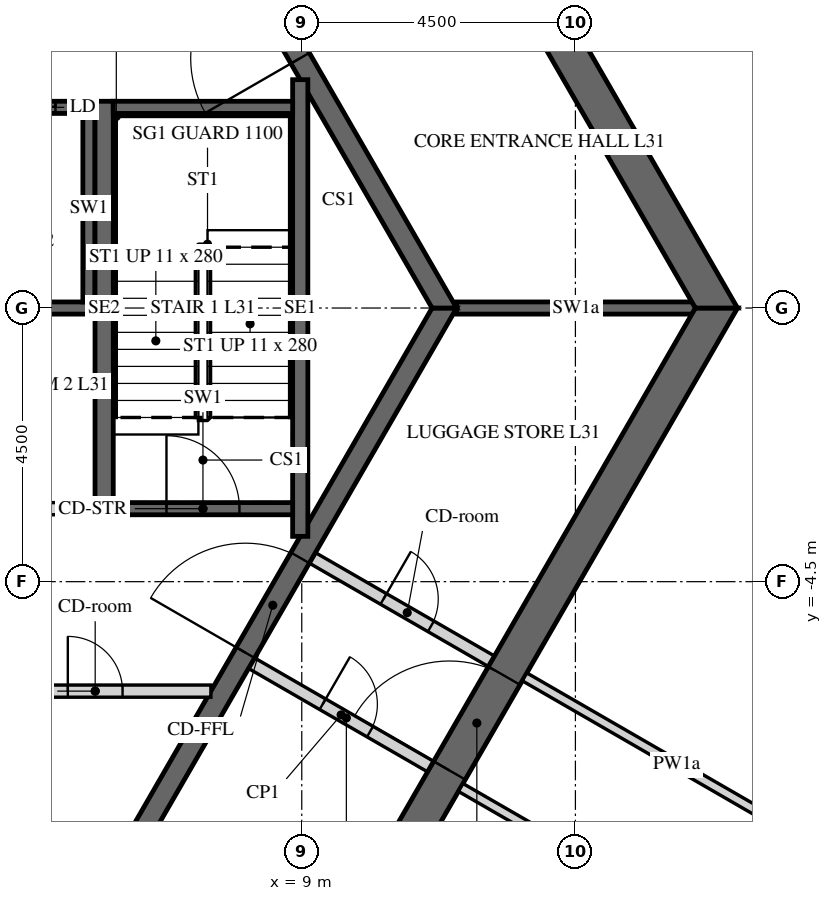
"""IFC4 building model, lengths in metres.
Left out: names, types, materials, properties, quantities, classifications, styles, units other than length and angle.
Written with IfcOpenShell. Run it as: python <this file> out.ifc"""

import sys

from ifc_helpers import new_model, si_unit, direction, frame, frame_2d, origin, place, context, subcontext, project, spatial, polyline, rectangle, outline, extrude, element, fill, save


model = new_model("IFC4")
c1 = context("Model", 3, precision=1e-05, world=origin(), true_north=direction((0.0, 1.0)))
c2 = subcontext(c1, "Body", "Model", "MODEL_VIEW")
j1 = project(units=[si_unit("LENGTHUNIT", "METRE"), si_unit("PLANEANGLEUNIT", "RADIAN")], contexts=[c1])
p1 = place(None, origin())
s1 = spatial("IfcSite", under=j1, at=p1, CompositionType="ELEMENT")
p2 = place(p1, origin())
s2 = spatial("IfcBuilding", under=s1, at=p2, CompositionType="ELEMENT")
p3 = place(p2, frame((0.0, 0.0, 135.0)))
s3 = spatial("IfcBuildingStorey", under=s2, at=p3, CompositionType="ELEMENT", Elevation=135.0)
p4 = place(p3, frame((7.91, -13.7, -0.15), z_axis=(0.0, 0.0, 1.0), x_axis=(0.499999880136, 0.866025472988, 0.0)))
e1 = element("IfcWall", 1, at=p4, inside=s3, PredefinedType="SHEAR", context=c2, shape_type="SweptSolid", body=[
    extrude(outline(polyline([(-0.173, -0.3), (15.993, -0.3), (15.646, 0.3), (0.173, 0.3), (-0.173, -0.3)])), origin(), (0.0, 0.0, 1.0), 3.9),
])
p5 = place(p4, frame((7.039, 0.0, 0.15)))
e2 = element("IfcOpeningElement", 2, at=p5, cuts=e1, PredefinedType="OPENING", context=c2, shape_type="SweptSolid", body=[
    extrude(rectangle(XDim=1.8, YDim=2.4, at=frame_2d((0.9, 1.2))), frame((0.0, 0.31, 0.0), z_axis=(0.0, -1.0, 0.0), x_axis=(1.0, 0.0, 0.0)), (0.0, 0.0, 1.0), 0.62),
])
p6 = place(p3, frame((15.819, 0.0, -0.15), z_axis=(0.0, 0.0, 1.0), x_axis=(-0.499999880136, 0.866025472988, 0.0)))
e3 = element("IfcWall", 3, at=p6, inside=s3, PredefinedType="SHEAR", context=c2, shape_type="SweptSolid", body=[
    extrude(outline(polyline([(-0.173, -0.3), (15.993, -0.3), (15.646, 0.3), (0.173, 0.3), (-0.173, -0.3)])), origin(), (0.0, 0.0, 1.0), 3.9),
])
p7 = place(p6, frame((6.981, 0.0, 0.15)))
e4 = element("IfcOpeningElement", 4, at=p7, cuts=e3, PredefinedType="OPENING", context=c2, shape_type="SweptSolid", body=[
    extrude(rectangle(XDim=1.8, YDim=2.4, at=frame_2d((0.9, 1.2))), frame((0.0, 0.31, 0.0), z_axis=(0.0, -1.0, 0.0), x_axis=(1.0, 0.0, 0.0)), (0.0, 0.0, 1.0), 0.62),
])
p8 = place(p3, frame((5.673, -9.825, -0.15), z_axis=(0.0, 0.0, 1.0), x_axis=(0.499995046907, 0.866028263435, 0.0)))
e5 = element("IfcWall", 5, at=p8, inside=s3, PredefinedType="SHEAR", context=c2, shape_type="SweptSolid", body=[
    extrude(outline(polyline([(-0.101, -0.175), (11.446, -0.175), (11.244, 0.175), (0.101, 0.175), (-0.101, -0.175)])), origin(), (0.0, 0.0, 1.0), 3.9),
])
p9 = place(p8, frame((4.801, 0.0, 0.15)))
e6 = element("IfcOpeningElement", 6, at=p9, cuts=e5, PredefinedType="OPENING", context=c2, shape_type="SweptSolid", body=[
    extrude(rectangle(XDim=1.8, YDim=2.4, at=frame_2d((0.9, 1.2))), frame((0.0, 0.185, 0.0), z_axis=(0.0, -1.0, 0.0), x_axis=(1.0, 0.0, 0.0)), (0.0, 0.0, 1.0), 0.37),
])
p10 = place(p3, frame((11.345, 0.0, -0.15), z_axis=(0.0, 0.0, 1.0), x_axis=(-0.499995046907, 0.866028263435, 0.0)))
e7 = element("IfcWall", 7, at=p10, inside=s3, PredefinedType="SHEAR", context=c2, shape_type="SweptSolid", body=[
    extrude(outline(polyline([(-0.101, -0.175), (11.446, -0.175), (11.244, 0.175), (0.101, 0.175), (-0.101, -0.175)])), origin(), (0.0, 0.0, 1.0), 3.9),
])
p11 = place(p10, frame((4.744, 0.0, 0.15)))
e8 = element("IfcOpeningElement", 8, at=p11, cuts=e7, PredefinedType="OPENING", context=c2, shape_type="SweptSolid", body=[
    extrude(rectangle(XDim=1.8, YDim=2.4, at=frame_2d((0.9, 1.2))), frame((0.0, 0.185, 0.0), z_axis=(0.0, -1.0, 0.0), x_axis=(1.0, 0.0, 0.0)), (0.0, 0.0, 1.0), 0.37),
])
p12 = place(p3, frame((-5.6, 3.3, -0.25), z_axis=(0.0, 0.0, 1.0), x_axis=(1.0, 0.0, 0.0)))
e9 = element("IfcWall", 9, at=p12, inside=s3, PredefinedType="SHEAR", context=c2, shape_type="SweptSolid", body=[
    extrude(rectangle(XDim=11.2, YDim=0.2, at=frame_2d((5.6, 0.0))), origin(), (0.0, 0.0, 1.0), 3.9),
])
p13 = place(p12, frame((0.65, 0.0, 0.25)))
e10 = element("IfcOpeningElement", 10, at=p13, cuts=e9, PredefinedType="OPENING", context=c2, shape_type="SweptSolid", body=[
    extrude(rectangle(XDim=1.1, YDim=2.1, at=frame_2d((0.55, 1.05))), frame((0.0, 0.11, 0.0), z_axis=(0.0, -1.0, 0.0), x_axis=(1.0, 0.0, 0.0)), (0.0, 0.0, 1.0), 0.22),
])
p14 = place(p12, frame((2.85, 0.0, 0.25)))
e11 = element("IfcOpeningElement", 11, at=p14, cuts=e9, PredefinedType="OPENING", context=c2, shape_type="SweptSolid", body=[
    extrude(rectangle(XDim=1.1, YDim=2.1, at=frame_2d((0.55, 1.05))), frame((0.0, 0.11, 0.0), z_axis=(0.0, -1.0, 0.0), x_axis=(1.0, 0.0, 0.0)), (0.0, 0.0, 1.0), 0.22),
])
p15 = place(p12, frame((5.05, 0.0, 0.25)))
e12 = element("IfcOpeningElement", 12, at=p15, cuts=e9, PredefinedType="OPENING", context=c2, shape_type="SweptSolid", body=[
    extrude(rectangle(XDim=1.1, YDim=2.1, at=frame_2d((0.55, 1.05))), frame((0.0, 0.11, 0.0), z_axis=(0.0, -1.0, 0.0), x_axis=(1.0, 0.0, 0.0)), (0.0, 0.0, 1.0), 0.22),
])
p16 = place(p12, frame((7.25, 0.0, 0.25)))
e13 = element("IfcOpeningElement", 13, at=p16, cuts=e9, PredefinedType="OPENING", context=c2, shape_type="SweptSolid", body=[
    extrude(rectangle(XDim=1.1, YDim=2.1, at=frame_2d((0.55, 1.05))), frame((0.0, 0.11, 0.0), z_axis=(0.0, -1.0, 0.0), x_axis=(1.0, 0.0, 0.0)), (0.0, 0.0, 1.0), 0.22),
])
p17 = place(p12, frame((9.45, 0.0, 0.25)))
e14 = element("IfcOpeningElement", 14, at=p17, cuts=e9, PredefinedType="OPENING", context=c2, shape_type="SweptSolid", body=[
    extrude(rectangle(XDim=1.1, YDim=2.1, at=frame_2d((0.55, 1.05))), frame((0.0, 0.11, 0.0), z_axis=(0.0, -1.0, 0.0), x_axis=(1.0, 0.0, 0.0)), (0.0, 0.0, 1.0), 0.22),
])
p18 = place(p3, frame((-5.6, 0.0, -0.25), z_axis=(0.0, 0.0, 1.0), x_axis=(1.0, 0.0, 0.0)))
e15 = element("IfcWall", 15, at=p18, inside=s3, PredefinedType="SHEAR", context=c2, shape_type="SweptSolid", body=[
    extrude(rectangle(XDim=11.2, YDim=0.2, at=frame_2d((5.6, 0.0))), origin(), (0.0, 0.0, 1.0), 3.9),
])
p19 = place(p3, frame((5.5, 0.1, -0.25), z_axis=(0.0, 0.0, 1.0), x_axis=(0.0, 1.0, 0.0)))
e16 = element("IfcWall", 16, at=p19, inside=s3, PredefinedType="SHEAR", context=c2, shape_type="SweptSolid", body=[
    extrude(rectangle(XDim=3.1, YDim=0.2, at=frame_2d((1.55, 0.0))), origin(), (0.0, 0.0, 1.0), 3.9),
])
p20 = place(p3, frame((0.1, -3.3, 0.0), z_axis=(0.0, 0.0, 1.0), x_axis=(1.0, 0.0, 0.0)))
e17 = element("IfcWall", 17, at=p20, inside=s3, PredefinedType="PARTITIONING", context=c2, shape_type="SweptSolid", body=[
    extrude(rectangle(XDim=5.5, YDim=0.2, at=frame_2d((2.75, 0.0))), origin(), (0.0, 0.0, 1.0), 3.65),
])
p21 = place(p20, frame((2.3, 0.0, 0.0)))
e18 = element("IfcOpeningElement", 18, at=p21, cuts=e17, PredefinedType="OPENING", context=c2, shape_type="SweptSolid", body=[
    extrude(rectangle(XDim=0.9, YDim=2.1, at=frame_2d((0.45, 1.05))), frame((0.0, 0.11, 0.0), z_axis=(0.0, -1.0, 0.0), x_axis=(1.0, 0.0, 0.0)), (0.0, 0.0, 1.0), 0.22),
])
p22 = place(p3, frame((3.7, -6.3, 0.0), z_axis=(0.0, 0.0, 1.0), x_axis=(1.0, 0.0, 0.0)))
e19 = element("IfcWall", 19, at=p22, inside=s3, PredefinedType="PARTITIONING", context=c2, shape_type="SweptSolid", body=[
    extrude(rectangle(XDim=3.806, YDim=0.2, at=frame_2d((1.903, 0.0))), origin(), (0.0, 0.0, 1.0), 3.65),
])
p23 = place(p22, frame((1.453, 0.0, 0.0)))
e20 = element("IfcOpeningElement", 20, at=p23, cuts=e19, PredefinedType="OPENING", context=c2, shape_type="SweptSolid", body=[
    extrude(rectangle(XDim=0.9, YDim=2.1, at=frame_2d((0.45, 1.05))), frame((0.0, 0.11, 0.0), z_axis=(0.0, -1.0, 0.0), x_axis=(1.0, 0.0, 0.0)), (0.0, 0.0, 1.0), 0.22),
])
p24 = place(p3, frame((11.547, 0.0, -0.15), z_axis=(0.0, 0.0, 1.0), x_axis=(1.0, 0.0, 0.0)))
e21 = element("IfcWall", 21, at=p24, inside=s3, PredefinedType="SHEAR", context=c2, shape_type="SweptSolid", body=[
    extrude(rectangle(XDim=3.926, YDim=0.2, at=frame_2d((1.963, 0.0))), origin(), (0.0, 0.0, 1.0), 3.9),
])
p25 = place(p3, frame((9.175, -4.109, 0.0), z_axis=(0.0, 0.0, 1.0), x_axis=(0.865989465428, -0.500062241894, 0.0)))
e22 = element("IfcWall", 22, at=p25, inside=s3, PredefinedType="PARTITIONING", context=c2, shape_type="SweptSolid", body=[
    extrude(rectangle(XDim=3.4, YDim=0.2, at=frame_2d((1.7, 0.0))), origin(), (0.0, 0.0, 1.0), 3.65),
])
p26 = place(p25, frame((1.351, 0.0, 0.0)))
e23 = element("IfcOpeningElement", 23, at=p26, cuts=e22, PredefinedType="OPENING", context=c2, shape_type="SweptSolid", body=[
    extrude(rectangle(XDim=0.9, YDim=2.1, at=frame_2d((0.45, 1.05))), frame((0.0, 0.11, 0.0), z_axis=(0.0, -1.0, 0.0), x_axis=(1.0, 0.0, 0.0)), (0.0, 0.0, 1.0), 0.22),
])
p27 = place(p3, frame((8.175, -5.841, 0.0), z_axis=(0.0, 0.0, 1.0), x_axis=(0.866020560687, -0.500008388397, 0.0)))
e24 = element("IfcWall", 24, at=p27, inside=s3, PredefinedType="PARTITIONING", context=c2, shape_type="SweptSolid", body=[
    extrude(rectangle(XDim=3.4, YDim=0.2, at=frame_2d((1.7, 0.0))), origin(), (0.0, 0.0, 1.0), 3.65),
])
p28 = place(p27, frame((1.35, 0.0, 0.0)))
e25 = element("IfcOpeningElement", 25, at=p28, cuts=e24, PredefinedType="OPENING", context=c2, shape_type="SweptSolid", body=[
    extrude(rectangle(XDim=0.9, YDim=2.1, at=frame_2d((0.45, 1.05))), frame((0.0, 0.11, 0.0), z_axis=(0.0, -1.0, 0.0), x_axis=(1.0, 0.0, 0.0)), (0.0, 0.0, 1.0), 0.22),
])
p29 = place(p3, frame((5.75, -3.4, -0.25), z_axis=(0.0, 0.0, 1.0), x_axis=(0.0, 1.0, 0.0)))
e26 = element("IfcWall", 26, at=p29, inside=s3, PredefinedType="SHEAR", context=c2, shape_type="SweptSolid", body=[
    extrude(rectangle(XDim=6.8, YDim=0.3, at=frame_2d((3.4, 0.0))), origin(), (0.0, 0.0, 1.0), 3.9),
])
p30 = place(p3, frame((8.975, -3.755, -0.25), z_axis=(0.0, 0.0, 1.0), x_axis=(0.0, 1.0, 0.0)))
e27 = element("IfcWall", 27, at=p30, inside=s3, PredefinedType="SHEAR", context=c2, shape_type="SweptSolid", body=[
    extrude(rectangle(XDim=7.51, YDim=0.25, at=frame_2d((3.755, 0.0))), origin(), (0.0, 0.0, 1.0), 3.9),
])
p31 = place(p3, frame((5.9, 3.3, -0.25), z_axis=(0.0, 0.0, 1.0), x_axis=(1.0, 0.0, 0.0)))
e28 = element("IfcWall", 28, at=p31, inside=s3, PredefinedType="SHEAR", context=c2, shape_type="SweptSolid", body=[
    extrude(rectangle(XDim=2.95, YDim=0.2, at=frame_2d((1.475, 0.0))), origin(), (0.0, 0.0, 1.0), 3.9),
])
p32 = place(p3, frame((5.9, -3.3, -0.25), z_axis=(0.0, 0.0, 1.0), x_axis=(1.0, 0.0, 0.0)))
e29 = element("IfcWall", 29, at=p32, inside=s3, PredefinedType="SHEAR", context=c2, shape_type="SweptSolid", body=[
    extrude(rectangle(XDim=2.95, YDim=0.2, at=frame_2d((1.475, 0.0))), origin(), (0.0, 0.0, 1.0), 3.9),
])
p33 = place(p32, frame((0.875, 0.0, 0.25)))
e30 = element("IfcOpeningElement", 30, at=p33, cuts=e29, PredefinedType="OPENING", context=c2, shape_type="SweptSolid", body=[
    extrude(rectangle(XDim=1.2, YDim=2.4, at=frame_2d((0.6, 1.2))), frame((0.0, 0.11, 0.0), z_axis=(0.0, -1.0, 0.0), x_axis=(1.0, 0.0, 0.0)), (0.0, 0.0, 1.0), 0.22),
])
p34 = place(p3, frame((13.755, -19.475, 0.0), z_axis=(0.0, 0.0, 1.0), x_axis=(0.50000013933, 0.866025323342, 0.0)))
e31 = element("IfcWall", 31, at=p34, inside=s3, PredefinedType="PARTITIONING", context=c2, shape_type="SweptSolid", body=[
    extrude(rectangle(XDim=23.517, YDim=0.15, at=frame_2d((11.758, 0.0))), origin(), (0.0, 0.0, 1.0), 2.838),
])
p35 = place(p34, frame((4.456, 0.0, 0.0)))
e32 = element("IfcOpeningElement", 32, at=p35, cuts=e31, PredefinedType="OPENING", context=c2, shape_type="SweptSolid", body=[
    extrude(rectangle(XDim=1.0, YDim=2.1, at=frame_2d((0.5, 1.05))), frame((0.0, 0.085, 0.0), z_axis=(0.0, -1.0, 0.0), x_axis=(1.0, 0.0, 0.0)), (0.0, 0.0, 1.0), 0.17),
])
p36 = place(p34, frame((13.699, 0.0, 0.0)))
e33 = element("IfcOpeningElement", 33, at=p36, cuts=e31, PredefinedType="OPENING", context=c2, shape_type="SweptSolid", body=[
    extrude(rectangle(XDim=1.0, YDim=2.1, at=frame_2d((0.5, 1.05))), frame((0.0, 0.085, 0.0), z_axis=(0.0, -1.0, 0.0), x_axis=(1.0, 0.0, 0.0)), (0.0, 0.0, 1.0), 0.17),
])
p37 = place(p34, frame((21.658, 0.0, 0.0)))
e34 = element("IfcOpeningElement", 34, at=p37, cuts=e31, PredefinedType="OPENING", context=c2, shape_type="SweptSolid", body=[
    extrude(rectangle(XDim=1.0, YDim=2.1, at=frame_2d((0.5, 1.05))), frame((0.0, 0.085, 0.0), z_axis=(0.0, -1.0, 0.0), x_axis=(1.0, 0.0, 0.0)), (0.0, 0.0, 1.0), 0.17),
])
p38 = place(p3, frame((25.467, 0.96, 0.0), z_axis=(0.0, 0.0, 1.0), x_axis=(-0.559200743185, 0.829032284547, 0.0)))
e35 = element("IfcWall", 35, at=p38, inside=s3, PredefinedType="PARTITIONING", context=c2, shape_type="SweptSolid", body=[
    extrude(rectangle(XDim=21.668, YDim=0.15, at=frame_2d((10.834, 0.0))), origin(), (0.0, 0.0, 1.0), 2.838),
])
p39 = place(p38, frame((10.434, 0.0, 0.0)))
e36 = element("IfcOpeningElement", 36, at=p39, cuts=e35, PredefinedType="OPENING", context=c2, shape_type="SweptSolid", body=[
    extrude(rectangle(XDim=1.0, YDim=2.1, at=frame_2d((0.5, 1.05))), frame((0.0, 0.085, 0.0), z_axis=(0.0, -1.0, 0.0), x_axis=(1.0, 0.0, 0.0)), (0.0, 0.0, 1.0), 0.17),
])
p40 = place(p3, frame((17.665, -8.953, 0.0), z_axis=(0.0, 0.0, 1.0), x_axis=(-0.866025774745, 0.499999357477, 0.0)))
e37 = element("IfcWall", 37, at=p40, inside=s3, PredefinedType="PARTITIONING", context=c2, shape_type="SweptSolid", body=[
    extrude(rectangle(XDim=5.775, YDim=0.15, at=frame_2d((2.887, 0.0))), origin(), (0.0, 0.0, 1.0), 2.838),
])
p41 = place(p3, frame((11.614, -7.884, 0.0), z_axis=(0.0, 0.0, 1.0), x_axis=(0.866018092707, -0.500012662943, 0.0)))
e38 = element("IfcWall", 38, at=p41, inside=s3, PredefinedType="PARTITIONING", context=c2, shape_type="SweptSolid", body=[
    extrude(rectangle(XDim=5.85, YDim=0.15, at=frame_2d((2.925, 0.0))), origin(), (0.0, 0.0, 1.0), 2.838),
])
p42 = place(p5, origin())
e39 = element("IfcDoor", 39, at=p42, inside=s3, OperationType="DOUBLE_DOOR_SINGLE_SWING", PredefinedType="DOOR", context=c2, shape_type="SweptSolid", body=[
    extrude(rectangle(XDim=1.8, YDim=2.4, at=frame_2d((0.9, 1.2))), frame((0.0, 0.025, 0.0), z_axis=(0.0, -1.0, 0.0), x_axis=(1.0, 0.0, 0.0)), (0.0, 0.0, 1.0), 0.05),
])
fill(e2, e39)
p43 = place(p11, origin())
e40 = element("IfcDoor", 40, at=p43, inside=s3, OperationType="DOUBLE_DOOR_SINGLE_SWING", PredefinedType="DOOR", context=c2, shape_type="SweptSolid", body=[
    extrude(rectangle(XDim=1.8, YDim=2.4, at=frame_2d((0.9, 1.2))), frame((0.0, 0.025, 0.0), z_axis=(0.0, -1.0, 0.0), x_axis=(1.0, 0.0, 0.0)), (0.0, 0.0, 1.0), 0.05),
])
fill(e8, e40)
p44 = place(p9, origin())
e41 = element("IfcDoor", 41, at=p44, inside=s3, OperationType="DOUBLE_DOOR_SINGLE_SWING", PredefinedType="DOOR", context=c2, shape_type="SweptSolid", body=[
    extrude(rectangle(XDim=1.8, YDim=2.4, at=frame_2d((0.9, 1.2))), frame((0.0, 0.025, 0.0), z_axis=(0.0, -1.0, 0.0), x_axis=(1.0, 0.0, 0.0)), (0.0, 0.0, 1.0), 0.05),
])
fill(e6, e41)
p45 = place(p23, origin())
e42 = element("IfcDoor", 42, at=p45, inside=s3, OperationType="SINGLE_SWING_LEFT", PredefinedType="DOOR", context=c2, shape_type="SweptSolid", body=[
    extrude(rectangle(XDim=0.9, YDim=2.1, at=frame_2d((0.45, 1.05))), frame((0.0, 0.025, 0.0), z_axis=(0.0, -1.0, 0.0), x_axis=(1.0, 0.0, 0.0)), (0.0, 0.0, 1.0), 0.05),
])
fill(e20, e42)
p46 = place(p26, origin())
e43 = element("IfcDoor", 43, at=p46, inside=s3, OperationType="SINGLE_SWING_LEFT", PredefinedType="DOOR", context=c2, shape_type="SweptSolid", body=[
    extrude(rectangle(XDim=0.9, YDim=2.1, at=frame_2d((0.45, 1.05))), frame((0.0, 0.025, 0.0), z_axis=(0.0, -1.0, 0.0), x_axis=(1.0, 0.0, 0.0)), (0.0, 0.0, 1.0), 0.05),
])
fill(e23, e43)
p47 = place(p28, origin())
e44 = element("IfcDoor", 44, at=p47, inside=s3, OperationType="SINGLE_SWING_LEFT", PredefinedType="DOOR", context=c2, shape_type="SweptSolid", body=[
    extrude(rectangle(XDim=0.9, YDim=2.1, at=frame_2d((0.45, 1.05))), frame((0.0, 0.025, 0.0), z_axis=(0.0, -1.0, 0.0), x_axis=(1.0, 0.0, 0.0)), (0.0, 0.0, 1.0), 0.05),
])
fill(e25, e44)
p48 = place(p33, origin())
e45 = element("IfcDoor", 45, at=p48, inside=s3, OperationType="SINGLE_SWING_LEFT", PredefinedType="DOOR", context=c2, shape_type="SweptSolid", body=[
    extrude(rectangle(XDim=1.2, YDim=2.4, at=frame_2d((0.6, 1.2))), frame((0.0, 0.025, 0.0), z_axis=(0.0, -1.0, 0.0), x_axis=(1.0, 0.0, 0.0)), (0.0, 0.0, 1.0), 0.05),
])
fill(e30, e45)
p49 = place(p17, origin())
e46 = element("IfcDoor", 46, at=p49, inside=s3, OperationType="SLIDING_TO_LEFT", PredefinedType="DOOR", context=c2, shape_type="SweptSolid", body=[
    extrude(rectangle(XDim=1.1, YDim=2.1, at=frame_2d((0.55, 1.05))), frame((0.0, 0.025, 0.0), z_axis=(0.0, -1.0, 0.0), x_axis=(1.0, 0.0, 0.0)), (0.0, 0.0, 1.0), 0.05),
])
fill(e14, e46)
save(model, sys.argv[1])
